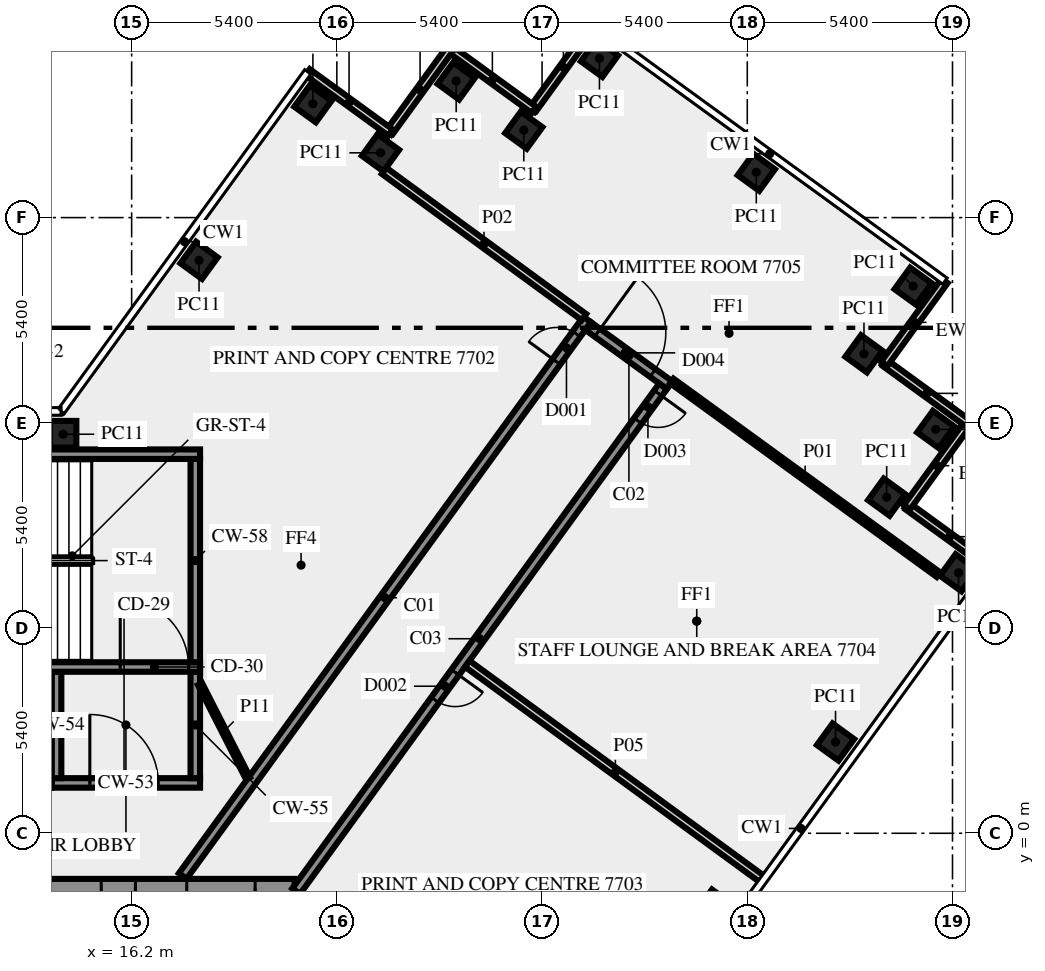
"""IFC4 building model, lengths in metres.
Left out: names, types, materials, properties, quantities, classifications, styles, units other than length and angle.
Written with IfcOpenShell. Run it as: python <this file> out.ifc"""

import sys

from ifc_helpers import new_model, si_unit, direction, frame, frame_2d, origin, origin_2d, place, context, subcontext, project, spatial, rectangle, extrude, element, fill, save


model = new_model("IFC4")
c1 = context("Model", 3, precision=1e-05, world=origin(), true_north=direction((0.0, 1.0)))
c2 = subcontext(c1, "Body", "Model", "MODEL_VIEW")
j1 = project(units=[si_unit("LENGTHUNIT", "METRE"), si_unit("PLANEANGLEUNIT", "RADIAN")], contexts=[c1])
p1 = place(None, origin())
s1 = spatial("IfcSite", under=j1, at=p1, CompositionType="ELEMENT")
p2 = place(p1, origin())
s2 = spatial("IfcBuilding", under=s1, at=p2, CompositionType="ELEMENT")
p3 = place(p2, frame((0.0, 0.0, 331.0)))
s3 = spatial("IfcBuildingStorey", under=s2, at=p3, CompositionType="ELEMENT", Elevation=331.0)
for number, where, z_axis, x_axis in (
    (1, (31.548, -1.969, 0.0), (0.0, 0.0, 1.0), (0.588, 0.809, 0.0)),
    (2, (34.722, 2.4, 0.0), (0.0, 0.0, 1.0), (0.588, 0.809, 0.0)),
    (3, (37.96, 6.855, 0.0), (0.0, 0.0, 1.0), (0.588, 0.809, 0.0)),
    (4, (36.068, 8.844, 0.0), (0.0, 0.0, 1.0), (0.588, 0.809, 0.0)),
    (5, (37.36, 10.625, 0.0), (0.0, 0.0, 1.0), (0.588, 0.809, 0.0)),
    (6, (35.471, 12.616, 0.0), (0.0, 0.0, 1.0), (-0.809, 0.588, 0.0)),
    (7, (36.765, 14.395, 0.0), (0.0, 0.0, 1.0), (-0.809, 0.588, 0.0)),
    (8, (32.637, 17.393, 0.0), (0.0, 0.0, 1.0), (-0.809, 0.588, 0.0)),
    (9, (28.51, 20.39, 0.0), (0.0, 0.0, 1.0), (-0.588, -0.809, 0.0)),
    (10, (26.519, 18.5, 0.0), (0.0, 0.0, 1.0), (-0.809, 0.588, 0.0)),
    (11, (24.74, 19.795, 0.0), (0.0, 0.0, 1.0), (-0.588, -0.809, 0.0)),
    (12, (22.749, 17.904, 0.0), (0.0, 0.0, 1.0), (-0.588, -0.809, 0.0)),
    (13, (20.97, 19.195, 0.0), (0.0, 0.0, 1.0), (-0.588, -0.809, 0.0)),
    (14, (17.974, 15.075, 0.0), (0.0, 0.0, 1.0), (-0.588, -0.809, 0.0)),
    (15, (14.395, 10.5, 0.0), (0.0, 0.0, 1.0), (-1.0, 0.0, 0.0)),
):
    element("IfcColumn", number, at=place(p3, frame(where, z_axis=z_axis, x_axis=x_axis)), inside=s3, PredefinedType="COLUMN", context=c2, shape_type="SweptSolid", body=[
        extrude(rectangle(XDim=0.7, YDim=0.7, at=origin_2d()), origin(), (0.0, 0.0, 1.0), 3.65),
    ])
for number, where, z_axis, x_axis in (
    (16, (38.814, 7.01, 0.0), (0.0, 0.0, 1.0), (-0.809, 0.588, 0.0)),
    (17, (36.602, 8.58, 0.0), (0.0, 0.0, 1.0), (0.588, 0.809, 0.0)),
    (18, (38.216, 10.782, 0.0), (0.0, 0.0, 1.0), (-0.809, 0.588, 0.0)),
    (19, (36.005, 12.352, 0.0), (0.0, 0.0, 1.0), (0.588, 0.809, 0.0)),
):
    element("IfcWall", number, at=place(p3, frame(where, z_axis=z_axis, x_axis=x_axis)), inside=s3, PredefinedType="SOLIDWALL", context=c2, shape_type="SweptSolid", body=[
        extrude(rectangle(XDim=2.7, YDim=0.2, at=frame_2d((1.35, 0.0))), origin(), (0.0, 0.0, 1.0), 3.65),
    ])
for number, where, z_axis, x_axis in (
    (20, (28.354, 21.247, 0.0), (0.0, 0.0, 1.0), (-0.588, -0.809, 0.0)),
    (21, (26.785, 19.036, 0.0), (0.0, 0.0, 1.0), (-0.809, 0.588, 0.0)),
):
    element("IfcWall", number, at=place(p3, frame(where, z_axis=z_axis, x_axis=x_axis)), inside=s3, PredefinedType="SOLIDWALL", context=c2, shape_type="SweptSolid", body=[
        extrude(rectangle(XDim=2.7, YDim=0.2, at=frame_2d((1.35, 0.0))), origin(), (0.0, 0.0, 1.0), 3.65),
    ])
for number, where, z_axis, x_axis in (
    (22, (24.583, 20.65, 0.0), (0.0, 0.0, 1.0), (-0.588, -0.809, 0.0)),
    (23, (23.013, 18.438, 0.0), (0.0, 0.0, 1.0), (-0.809, 0.588, 0.0)),
):
    element("IfcWall", number, at=place(p3, frame(where, z_axis=z_axis, x_axis=x_axis)), inside=s3, PredefinedType="SOLIDWALL", context=c2, shape_type="SweptSolid", body=[
        extrude(rectangle(XDim=2.7, YDim=0.2, at=frame_2d((1.35, 0.0))), origin(), (0.0, 0.0, 1.0), 3.65),
    ])
p4 = place(p3, frame((20.49, -1.45, 0.0), z_axis=(0.0, 0.0, 1.0), x_axis=(-1.0, 0.0, 0.0)))
e24 = element("IfcWall", 24, at=p4, inside=s3, PredefinedType="SHEAR", context=c2, shape_type="SweptSolid", body=[
    extrude(rectangle(XDim=40.98, YDim=0.5, at=frame_2d((20.49, 0.0))), origin(), (0.0, 0.0, 1.0), 3.65),
])
p5 = place(p4, frame((38.14, 0.0, 0.0)))
e25 = element("IfcOpeningElement", 25, at=p5, cuts=e24, PredefinedType="OPENING", context=c2, shape_type="SweptSolid", body=[
    extrude(rectangle(XDim=1.8, YDim=2.1, at=frame_2d((0.9, 1.05))), frame((0.0, 0.26, 0.0), z_axis=(0.0, -1.0, 0.0), x_axis=(1.0, 0.0, 0.0)), (0.0, 0.0, 1.0), 0.52),
])
p6 = place(p4, frame((36.728, 0.0, 0.0)))
e26 = element("IfcOpeningElement", 26, at=p6, cuts=e24, PredefinedType="OPENING", context=c2, shape_type="SweptSolid", body=[
    extrude(rectangle(XDim=0.8, YDim=2.1, at=frame_2d((0.4, 1.05))), frame((0.0, 0.26, 0.0), z_axis=(0.0, -1.0, 0.0), x_axis=(1.0, 0.0, 0.0)), (0.0, 0.0, 1.0), 0.52),
])
p7 = place(p4, frame((35.153, 0.0, 0.0)))
e27 = element("IfcOpeningElement", 27, at=p7, cuts=e24, PredefinedType="OPENING", context=c2, shape_type="SweptSolid", body=[
    extrude(rectangle(XDim=0.8, YDim=2.1, at=frame_2d((0.4, 1.05))), frame((0.0, 0.26, 0.0), z_axis=(0.0, -1.0, 0.0), x_axis=(1.0, 0.0, 0.0)), (0.0, 0.0, 1.0), 0.52),
])
p8 = place(p4, frame((32.94, 0.0, 0.0)))
e28 = element("IfcOpeningElement", 28, at=p8, cuts=e24, PredefinedType="OPENING", context=c2, shape_type="SweptSolid", body=[
    extrude(rectangle(XDim=0.9, YDim=2.1, at=frame_2d((0.45, 1.05))), frame((0.0, 0.26, 0.0), z_axis=(0.0, -1.0, 0.0), x_axis=(1.0, 0.0, 0.0)), (0.0, 0.0, 1.0), 0.52),
])
p9 = place(p4, frame((31.015, 0.0, 0.0)))
e29 = element("IfcOpeningElement", 29, at=p9, cuts=e24, PredefinedType="OPENING", context=c2, shape_type="SweptSolid", body=[
    extrude(rectangle(XDim=0.8, YDim=2.1, at=frame_2d((0.4, 1.05))), frame((0.0, 0.26, 0.0), z_axis=(0.0, -1.0, 0.0), x_axis=(1.0, 0.0, 0.0)), (0.0, 0.0, 1.0), 0.52),
])
p10 = place(p4, frame((24.765, 0.0, 0.0)))
e30 = element("IfcOpeningElement", 30, at=p10, cuts=e24, PredefinedType="OPENING", context=c2, shape_type="SweptSolid", body=[
    extrude(rectangle(XDim=0.8, YDim=2.1, at=frame_2d((0.4, 1.05))), frame((0.0, 0.26, 0.0), z_axis=(0.0, -1.0, 0.0), x_axis=(1.0, 0.0, 0.0)), (0.0, 0.0, 1.0), 0.52),
])
p11 = place(p4, frame((19.59, 0.0, 0.0)))
e31 = element("IfcOpeningElement", 31, at=p11, cuts=e24, PredefinedType="OPENING", context=c2, shape_type="SweptSolid", body=[
    extrude(rectangle(XDim=2.0, YDim=2.1, at=frame_2d((1.0, 1.05))), frame((0.0, 0.26, 0.0), z_axis=(0.0, -1.0, 0.0), x_axis=(1.0, 0.0, 0.0)), (0.0, 0.0, 1.0), 0.52),
])
p12 = place(p4, frame((15.103, 0.0, 0.0)))
e32 = element("IfcOpeningElement", 32, at=p12, cuts=e24, PredefinedType="OPENING", context=c2, shape_type="SweptSolid", body=[
    extrude(rectangle(XDim=0.9, YDim=2.1, at=frame_2d((0.45, 1.05))), frame((0.0, 0.26, 0.0), z_axis=(0.0, -1.0, 0.0), x_axis=(1.0, 0.0, 0.0)), (0.0, 0.0, 1.0), 0.52),
])
p13 = place(p4, frame((13.04, 0.0, 0.0)))
e33 = element("IfcOpeningElement", 33, at=p13, cuts=e24, PredefinedType="OPENING", context=c2, shape_type="SweptSolid", body=[
    extrude(rectangle(XDim=0.9, YDim=2.1, at=frame_2d((0.45, 1.05))), frame((0.0, 0.26, 0.0), z_axis=(0.0, -1.0, 0.0), x_axis=(1.0, 0.0, 0.0)), (0.0, 0.0, 1.0), 0.52),
])
p14 = place(p4, frame((10.177, 0.0, 0.0)))
e34 = element("IfcOpeningElement", 34, at=p14, cuts=e24, PredefinedType="OPENING", context=c2, shape_type="SweptSolid", body=[
    extrude(rectangle(XDim=0.9, YDim=2.1, at=frame_2d((0.45, 1.05))), frame((0.0, 0.26, 0.0), z_axis=(0.0, -1.0, 0.0), x_axis=(1.0, 0.0, 0.0)), (0.0, 0.0, 1.0), 0.52),
])
p15 = place(p4, frame((7.14, 0.0, 0.0)))
e35 = element("IfcOpeningElement", 35, at=p15, cuts=e24, PredefinedType="OPENING", context=c2, shape_type="SweptSolid", body=[
    extrude(rectangle(XDim=0.9, YDim=2.1, at=frame_2d((0.45, 1.05))), frame((0.0, 0.26, 0.0), z_axis=(0.0, -1.0, 0.0), x_axis=(1.0, 0.0, 0.0)), (0.0, 0.0, 1.0), 0.52),
])
p16 = place(p4, frame((4.19, 0.0, 0.0)))
e36 = element("IfcOpeningElement", 36, at=p16, cuts=e24, PredefinedType="OPENING", context=c2, shape_type="SweptSolid", body=[
    extrude(rectangle(XDim=0.9, YDim=2.1, at=frame_2d((0.45, 1.05))), frame((0.0, 0.26, 0.0), z_axis=(0.0, -1.0, 0.0), x_axis=(1.0, 0.0, 0.0)), (0.0, 0.0, 1.0), 0.52),
])
p17 = place(p4, frame((1.04, 0.0, 0.0)))
e37 = element("IfcOpeningElement", 37, at=p17, cuts=e24, PredefinedType="OPENING", context=c2, shape_type="SweptSolid", body=[
    extrude(rectangle(XDim=1.8, YDim=2.1, at=frame_2d((0.9, 1.05))), frame((0.0, 0.26, 0.0), z_axis=(0.0, -1.0, 0.0), x_axis=(1.0, 0.0, 0.0)), (0.0, 0.0, 1.0), 0.52),
])
p18 = place(p3, frame((14.1, 1.325, 0.0), z_axis=(0.0, 0.0, 1.0), x_axis=(1.0, 0.0, 0.0)))
e38 = element("IfcWall", 38, at=p18, inside=s3, PredefinedType="SHEAR", context=c2, shape_type="SweptSolid", body=[
    extrude(rectangle(XDim=3.9, YDim=0.25, at=frame_2d((1.95, 0.0))), origin(), (0.0, 0.0, 1.0), 3.65),
])
p19 = place(p18, frame((1.0, 0.0, 0.0)))
e39 = element("IfcOpeningElement", 39, at=p19, cuts=e38, PredefinedType="OPENING", context=c2, shape_type="SweptSolid", body=[
    extrude(rectangle(XDim=1.8, YDim=2.1, at=frame_2d((0.9, 1.05))), frame((0.0, 0.135, 0.0), z_axis=(0.0, -1.0, 0.0), x_axis=(1.0, 0.0, 0.0)), (0.0, 0.0, 1.0), 0.27),
])
for number, where, z_axis, x_axis in (
    (40, (14.225, 1.45, 0.0), (0.0, 0.0, 1.0), (0.0, 1.0, 0.0)),
    (41, (17.875, 1.45, 0.0), (0.0, 0.0, 1.0), (0.0, 1.0, 0.0)),
):
    element("IfcWall", number, at=place(p3, frame(where, z_axis=z_axis, x_axis=x_axis)), inside=s3, PredefinedType="SHEAR", context=c2, shape_type="SweptSolid", body=[
        extrude(rectangle(XDim=2.8, YDim=0.25, at=frame_2d((1.4, 0.0))), origin(), (0.0, 0.0, 1.0), 3.65),
    ])
p20 = place(p3, frame((7.5, 4.375, 0.0), z_axis=(0.0, 0.0, 1.0), x_axis=(1.0, 0.0, 0.0)))
e42 = element("IfcWall", 42, at=p20, inside=s3, PredefinedType="SHEAR", context=c2, shape_type="SweptSolid", body=[
    extrude(rectangle(XDim=10.5, YDim=0.25, at=frame_2d((5.25, 0.0))), origin(), (0.0, 0.0, 1.0), 3.65),
])
p21 = place(p20, frame((8.4, 0.0, 0.0)))
e43 = element("IfcOpeningElement", 43, at=p21, cuts=e42, PredefinedType="OPENING", context=c2, shape_type="SweptSolid", body=[
    extrude(rectangle(XDim=1.8, YDim=2.1, at=frame_2d((0.9, 1.05))), frame((0.0, 0.135, 0.0), z_axis=(0.0, -1.0, 0.0), x_axis=(1.0, 0.0, 0.0)), (0.0, 0.0, 1.0), 0.27),
])
p22 = place(p3, frame((17.875, 4.5, 0.0), z_axis=(0.0, 0.0, 1.0), x_axis=(0.0, 1.0, 0.0)))
e44 = element("IfcWall", 44, at=p22, inside=s3, PredefinedType="SHEAR", context=c2, shape_type="SweptSolid", body=[
    extrude(rectangle(XDim=5.35, YDim=0.25, at=frame_2d((2.675, 0.0))), origin(), (0.0, 0.0, 1.0), 3.65),
])
p23 = place(p3, frame((7.5, 9.975, 0.0), z_axis=(0.0, 0.0, 1.0), x_axis=(1.0, 0.0, 0.0)))
e45 = element("IfcWall", 45, at=p23, inside=s3, PredefinedType="SHEAR", context=c2, shape_type="SweptSolid", body=[
    extrude(rectangle(XDim=10.5, YDim=0.25, at=frame_2d((5.25, 0.0))), origin(), (0.0, 0.0, 1.0), 3.65),
])
p24 = place(p23, frame((2.0, 0.0, 1.0)))
e46 = element("IfcOpeningElement", 46, at=p24, cuts=e45, PredefinedType="OPENING", context=c2, shape_type="SweptSolid", body=[
    extrude(rectangle(XDim=1.2, YDim=1.2, at=frame_2d((0.6, 0.6))), frame((0.0, 0.135, 0.0), z_axis=(0.0, -1.0, 0.0), x_axis=(1.0, 0.0, 0.0)), (0.0, 0.0, 1.0), 0.27),
])
p25 = place(p3, frame((17.545, -1.125, 0.0), z_axis=(0.0, 0.0, 1.0), x_axis=(0.58779555165, 0.809009511354, 0.0)))
e47 = element("IfcWall", 47, at=p25, inside=s3, PredefinedType="SOLIDWALL", context=c2, shape_type="SweptSolid", body=[
    extrude(rectangle(XDim=18.103, YDim=0.25, at=frame_2d((9.052, 0.0))), origin(), (0.0, 0.0, 1.0), 3.65),
])
p26 = place(p25, frame((16.728, 0.0, 0.0)))
e48 = element("IfcOpeningElement", 48, at=p26, cuts=e47, PredefinedType="OPENING", context=c2, shape_type="SweptSolid", body=[
    extrude(rectangle(XDim=0.9, YDim=2.1, at=frame_2d((0.45, 1.05))), frame((0.0, 0.135, 0.0), z_axis=(0.0, -1.0, 0.0), x_axis=(1.0, 0.0, 0.0)), (0.0, 0.0, 1.0), 0.27),
])
p27 = place(p3, frame((28.213, 13.346, 0.0), z_axis=(0.0, 0.0, 1.0), x_axis=(0.809006914995, -0.587799125119, 0.0)))
e49 = element("IfcWall", 49, at=p27, inside=s3, PredefinedType="SOLIDWALL", context=c2, shape_type="SweptSolid", body=[
    extrude(rectangle(XDim=2.65, YDim=0.25, at=frame_2d((1.325, 0.0))), origin(), (0.0, 0.0, 1.0), 3.65),
])
p28 = place(p27, frame((0.3, 0.0, 0.0)))
e50 = element("IfcOpeningElement", 50, at=p28, cuts=e49, PredefinedType="OPENING", context=c2, shape_type="SweptSolid", body=[
    extrude(rectangle(XDim=1.8, YDim=2.1, at=frame_2d((0.9, 1.05))), frame((0.0, 0.135, 0.0), z_axis=(0.0, -1.0, 0.0), x_axis=(1.0, 0.0, 0.0)), (0.0, 0.0, 1.0), 0.27),
])
p29 = place(p3, frame((30.183, 11.761, 0.0), z_axis=(0.0, 0.0, 1.0), x_axis=(-0.587781762867, -0.80901952958, 0.0)))
e51 = element("IfcWall", 51, at=p29, inside=s3, PredefinedType="SOLIDWALL", context=c2, shape_type="SweptSolid", body=[
    extrude(rectangle(XDim=16.42, YDim=0.25, at=frame_2d((8.21, 0.0))), origin(), (0.0, 0.0, 1.0), 3.65),
])
p30 = place(p29, frame((0.225, 0.0, 0.0)))
e52 = element("IfcOpeningElement", 52, at=p30, cuts=e51, PredefinedType="OPENING", context=c2, shape_type="SweptSolid", body=[
    extrude(rectangle(XDim=0.9, YDim=2.1, at=frame_2d((0.45, 1.05))), frame((0.0, 0.135, 0.0), z_axis=(0.0, -1.0, 0.0), x_axis=(1.0, 0.0, 0.0)), (0.0, 0.0, 1.0), 0.27),
])
p31 = place(p29, frame((9.304, 0.0, 0.0)))
e53 = element("IfcOpeningElement", 53, at=p31, cuts=e51, PredefinedType="OPENING", context=c2, shape_type="SweptSolid", body=[
    extrude(rectangle(XDim=0.9, YDim=2.1, at=frame_2d((0.45, 1.05))), frame((0.0, 0.135, 0.0), z_axis=(0.0, -1.0, 0.0), x_axis=(1.0, 0.0, 0.0)), (0.0, 0.0, 1.0), 0.27),
])
p32 = place(p3, frame((30.415, 11.902, 0.0), z_axis=(0.0, 0.0, 1.0), x_axis=(0.809020922653, -0.587779845444, 0.0)))
e54 = element("IfcWall", 54, at=p32, inside=s3, PredefinedType="PARTITIONING", context=c2, shape_type="SweptSolid", body=[
    extrude(rectangle(XDim=8.67, YDim=0.15, at=frame_2d((4.335, 0.0))), origin(), (0.0, 0.0, 1.0), 3.65),
])
p33 = place(p3, frame((22.844, 17.43, 0.0), z_axis=(0.0, 0.0, 1.0), x_axis=(0.80699548015, -0.590557613631, 0.0)))
e55 = element("IfcWall", 55, at=p33, inside=s3, PredefinedType="SOLIDWALL", context=c2, shape_type="SweptSolid", body=[
    extrude(rectangle(XDim=6.515, YDim=0.2, at=frame_2d((3.258, 0.0))), origin(), (0.0, 0.0, 1.0), 3.65),
])
p34 = place(p3, frame((25.032, 4.459, 0.0), z_axis=(0.0, 0.0, 1.0), x_axis=(0.807602415854, -0.589727342004, 0.0)))
e56 = element("IfcWall", 56, at=p34, inside=s3, PredefinedType="SOLIDWALL", context=c2, shape_type="SweptSolid", body=[
    extrude(rectangle(XDim=9.651, YDim=0.2, at=frame_2d((4.826, 0.0))), origin(), (0.0, 0.0, 1.0), 2.95),
])
p35 = place(p3, frame((18.0, 3.925, 0.0), z_axis=(0.0, 0.0, 1.0), x_axis=(0.453950796792, -0.891026752736, 0.0)))
e57 = element("IfcWall", 57, at=p35, inside=s3, PredefinedType="PARTITIONING", context=c2, shape_type="SweptSolid", body=[
    extrude(rectangle(XDim=2.778, YDim=0.12, at=frame_2d((1.389, 0.0))), origin(), (0.0, 0.0, 1.0), 3.65),
])
p36 = place(p16, origin())
e58 = element("IfcDoor", 58, at=p36, inside=s3, OperationType="SINGLE_SWING_LEFT", PredefinedType="DOOR", context=c2, shape_type="SweptSolid", body=[
    extrude(rectangle(XDim=0.9, YDim=2.1, at=frame_2d((0.45, 1.05))), frame((0.0, 0.025, 0.0), z_axis=(0.0, -1.0, 0.0), x_axis=(1.0, 0.0, 0.0)), (0.0, 0.0, 1.0), 0.05),
])
fill(e36, e58)
p37 = place(p17, origin())
e59 = element("IfcDoor", 59, at=p37, inside=s3, OperationType="DOUBLE_DOOR_SINGLE_SWING", PredefinedType="DOOR", context=c2, shape_type="SweptSolid", body=[
    extrude(rectangle(XDim=1.8, YDim=2.1, at=frame_2d((0.9, 1.05))), frame((0.0, 0.025, 0.0), z_axis=(0.0, -1.0, 0.0), x_axis=(1.0, 0.0, 0.0)), (0.0, 0.0, 1.0), 0.05),
])
fill(e37, e59)
p38 = place(p19, origin())
e60 = element("IfcDoor", 60, at=p38, inside=s3, OperationType="DOUBLE_DOOR_SINGLE_SWING", PredefinedType="DOOR", context=c2, shape_type="SweptSolid", body=[
    extrude(rectangle(XDim=1.8, YDim=2.1, at=frame_2d((0.9, 1.05))), frame((0.0, 0.025, 0.0), z_axis=(0.0, -1.0, 0.0), x_axis=(1.0, 0.0, 0.0)), (0.0, 0.0, 1.0), 0.05),
])
fill(e39, e60)
p39 = place(p21, origin())
e61 = element("IfcDoor", 61, at=p39, inside=s3, OperationType="DOUBLE_DOOR_SINGLE_SWING", PredefinedType="DOOR", context=c2, shape_type="SweptSolid", body=[
    extrude(rectangle(XDim=1.8, YDim=2.1, at=frame_2d((0.9, 1.05))), frame((0.0, 0.025, 0.0), z_axis=(0.0, -1.0, 0.0), x_axis=(1.0, 0.0, 0.0)), (0.0, 0.0, 1.0), 0.05),
])
fill(e43, e61)
p40 = place(p28, origin())
e62 = element("IfcDoor", 62, at=p40, inside=s3, OperationType="DOUBLE_DOOR_SINGLE_SWING", PredefinedType="DOOR", context=c2, shape_type="SweptSolid", body=[
    extrude(rectangle(XDim=1.8, YDim=2.1, at=frame_2d((0.9, 1.05))), frame((0.0, 0.025, 0.0), z_axis=(0.0, -1.0, 0.0), x_axis=(1.0, 0.0, 0.0)), (0.0, 0.0, 1.0), 0.05),
])
fill(e50, e62)
p41 = place(p30, origin())
e63 = element("IfcDoor", 63, at=p41, inside=s3, OperationType="SINGLE_SWING_LEFT", PredefinedType="DOOR", context=c2, shape_type="SweptSolid", body=[
    extrude(rectangle(XDim=0.9, YDim=2.1, at=frame_2d((0.45, 1.05))), frame((0.0, 0.025, 0.0), z_axis=(0.0, -1.0, 0.0), x_axis=(1.0, 0.0, 0.0)), (0.0, 0.0, 1.0), 0.05),
])
fill(e52, e63)
p42 = place(p26, origin())
e64 = element("IfcDoor", 64, at=p42, inside=s3, OperationType="SINGLE_SWING_RIGHT", PredefinedType="DOOR", context=c2, shape_type="SweptSolid", body=[
    extrude(rectangle(XDim=0.9, YDim=2.1, at=frame_2d((0.45, 1.05))), frame((0.0, 0.025, 0.0), z_axis=(0.0, -1.0, 0.0), x_axis=(1.0, 0.0, 0.0)), (0.0, 0.0, 1.0), 0.05),
])
fill(e48, e64)
p43 = place(p31, origin())
e65 = element("IfcDoor", 65, at=p43, inside=s3, OperationType="SINGLE_SWING_LEFT", PredefinedType="DOOR", context=c2, shape_type="SweptSolid", body=[
    extrude(rectangle(XDim=0.9, YDim=2.1, at=frame_2d((0.45, 1.05))), frame((0.0, 0.025, 0.0), z_axis=(0.0, -1.0, 0.0), x_axis=(1.0, 0.0, 0.0)), (0.0, 0.0, 1.0), 0.05),
])
fill(e53, e65)
save(model, sys.argv[1])
